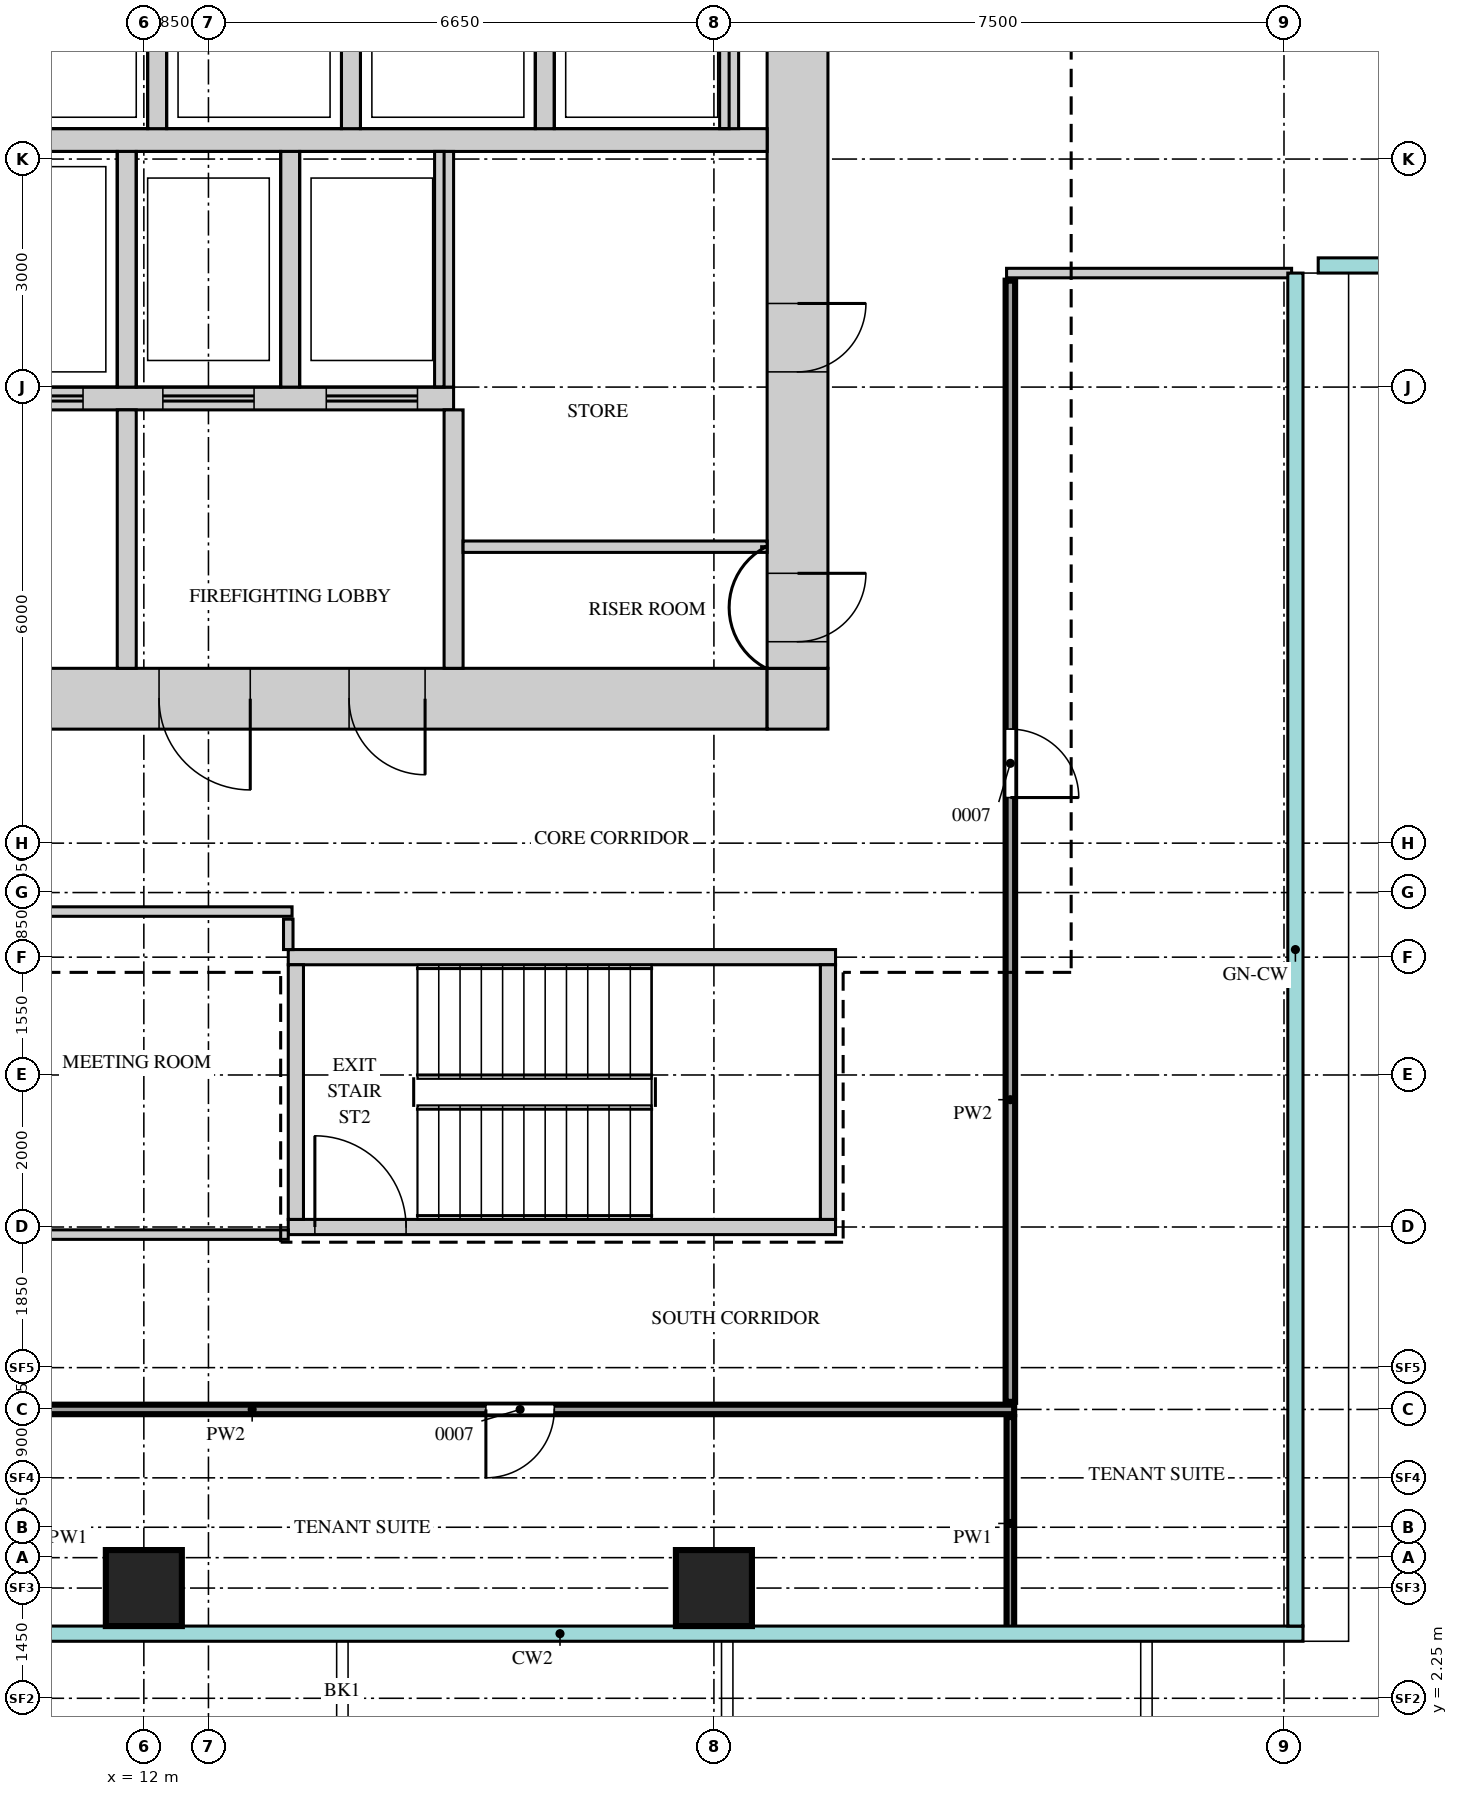
"""IFC4 building model, lengths in metres.
Left out: names, types, materials, properties, quantities, classifications, styles, units other than length and angle.
Written with IfcOpenShell. Run it as: python <this file> out.ifc"""

import sys

from ifc_helpers import new_model, si_unit, direction, frame, frame_2d, origin, origin_2d, place, context, subcontext, project, spatial, rectangle, extrude, source, transform, mapped, element, fill, save


model = new_model("IFC4")
c1 = context("Model", 3, precision=1e-05, world=origin(), true_north=direction((0.0, 1.0)))
c2 = subcontext(c1, "Body", "Model", "MODEL_VIEW")
j1 = project(units=[si_unit("LENGTHUNIT", "METRE"), si_unit("PLANEANGLEUNIT", "RADIAN")], contexts=[c1])
p1 = place(None, origin())
s1 = spatial("IfcSite", under=j1, at=p1, CompositionType="ELEMENT")
p2 = place(p1, origin())
s2 = spatial("IfcBuilding", under=s1, at=p2, CompositionType="ELEMENT")
p3 = place(p2, frame((0.0, 0.0, 176.7)))
s3 = spatial("IfcBuildingStorey", under=s2, at=p3, CompositionType="ELEMENT", Elevation=176.7)
m1 = source(origin(), c2, "Body", "SweptSolid", [
    extrude(rectangle(XDim=13.4, YDim=0.8, at=frame_2d((6.7, 0.0))), origin(), (0.0, 0.0, 1.0), 3.75),
])
p4 = place(p3, frame((6.8, 15.4, 0.0), z_axis=(0.0, 0.0, 1.0), x_axis=(1.0, 0.0, 0.0)))
e1 = element("IfcWall", 1, at=p4, inside=s3, PredefinedType="SHEAR", context=c2, shape_type="MappedRepresentation", body=[
    mapped(m1, transform((0.0, 0.0, 0.0))),
])
m2 = source(origin(), c2, "Body", "SweptSolid", [
    extrude(rectangle(XDim=1.2, YDim=2.1, at=frame_2d((0.6, 1.05))), frame((0.0, 0.41, 0.0), z_axis=(0.0, -1.0, 0.0), x_axis=(1.0, 0.0, 0.0)), (0.0, 0.0, 1.0), 0.82),
])
p5 = place(p4, frame((5.4, 0.0, 0.0)))
e2 = element("IfcOpeningElement", 2, at=p5, cuts=e1, PredefinedType="OPENING", context=c2, shape_type="MappedRepresentation", body=[
    mapped(m2, transform((0.0, 0.0, 0.0))),
])
p6 = place(p4, frame((2.05, 0.0, 0.0)))
e3 = element("IfcOpeningElement", 3, at=p6, cuts=e1, PredefinedType="OPENING", context=c2, shape_type="MappedRepresentation", body=[
    mapped(m2, transform((0.0, 0.0, 0.0))),
])
m3 = source(origin(), c2, "Body", "SweptSolid", [
    extrude(rectangle(XDim=1.0, YDim=2.1, at=frame_2d((0.5, 1.05))), frame((0.0, 0.41, 0.0), z_axis=(0.0, -1.0, 0.0), x_axis=(1.0, 0.0, 0.0)), (0.0, 0.0, 1.0), 0.82),
])
p7 = place(p4, frame((7.9, 0.0, 0.0)))
e4 = element("IfcOpeningElement", 4, at=p7, cuts=e1, PredefinedType="OPENING", context=c2, shape_type="MappedRepresentation", body=[
    mapped(m3, transform((0.0, 0.0, 0.0))),
])
m4 = source(origin(), c2, "Body", "SweptSolid", [
    extrude(rectangle(XDim=0.8, YDim=0.8, at=frame_2d((0.4, 0.0))), origin(), (0.0, 0.0, 1.0), 3.75),
])
p8 = place(p3, frame((20.2, 15.4, 0.0), z_axis=(0.0, 0.0, 1.0), x_axis=(1.0, 0.0, 0.0)))
e5 = element("IfcWall", 5, at=p8, inside=s3, PredefinedType="SHEAR", context=c2, shape_type="MappedRepresentation", body=[
    mapped(m4, transform((0.0, 0.0, 0.0))),
])
m5 = source(origin(), c2, "Body", "SweptSolid", [
    extrude(rectangle(XDim=22.4, YDim=0.8, at=frame_2d((11.2, 0.0))), origin(), (0.0, 0.0, 1.0), 3.75),
])
p9 = place(p3, frame((20.6, 15.8, 0.0), z_axis=(0.0, 0.0, 1.0), x_axis=(0.0, 1.0, 0.0)))
e6 = element("IfcWall", 6, at=p9, inside=s3, PredefinedType="SHEAR", context=c2, shape_type="MappedRepresentation", body=[
    mapped(m5, transform((0.0, 0.0, 0.0))),
])
m6 = source(origin(), c2, "Body", "SweptSolid", [
    extrude(rectangle(XDim=1.8, YDim=2.1, at=frame_2d((0.9, 1.05))), frame((0.0, 0.41, 0.0), z_axis=(0.0, -1.0, 0.0), x_axis=(1.0, 0.0, 0.0)), (0.0, 0.0, 1.0), 0.82),
])
p10 = place(p9, frame((10.7, 0.0, 0.0)))
e7 = element("IfcOpeningElement", 7, at=p10, cuts=e6, PredefinedType="OPENING", context=c2, shape_type="MappedRepresentation", body=[
    mapped(m6, transform((0.0, 0.0, 0.0))),
])
m7 = source(origin(), c2, "Body", "SweptSolid", [
    extrude(rectangle(XDim=0.9, YDim=2.1, at=frame_2d((0.45, 1.05))), frame((0.0, 0.41, 0.0), z_axis=(0.0, -1.0, 0.0), x_axis=(1.0, 0.0, 0.0)), (0.0, 0.0, 1.0), 0.82),
])
p11 = place(p9, frame((0.35, 0.0, 0.0)))
e8 = element("IfcOpeningElement", 8, at=p11, cuts=e6, PredefinedType="OPENING", context=c2, shape_type="MappedRepresentation", body=[
    mapped(m7, transform((0.0, 0.0, 0.0))),
])
p12 = place(p9, frame((3.9, 0.0, 0.0)))
e9 = element("IfcOpeningElement", 9, at=p12, cuts=e6, PredefinedType="OPENING", context=c2, shape_type="MappedRepresentation", body=[
    mapped(m7, transform((0.0, 0.0, 0.0))),
])
m8 = source(origin(), c2, "Body", "SweptSolid", [
    extrude(rectangle(XDim=7.2, YDim=0.2, at=frame_2d((3.6, 0.0))), origin(), (0.0, 0.0, 1.0), 3.75),
])
p13 = place(p3, frame((13.9, 12.0, 0.0), z_axis=(0.0, 0.0, 1.0), x_axis=(1.0, 0.0, 0.0)))
e10 = element("IfcWall", 10, at=p13, inside=s3, PredefinedType="SHEAR", context=c2, shape_type="MappedRepresentation", body=[
    mapped(m8, transform((0.0, 0.0, 0.0))),
])
p14 = place(p3, frame((13.9, 8.45, 0.0), z_axis=(0.0, 0.0, 1.0), x_axis=(1.0, 0.0, 0.0)))
e11 = element("IfcWall", 11, at=p14, inside=s3, PredefinedType="SHEAR", context=c2, shape_type="MappedRepresentation", body=[
    mapped(m8, transform((0.0, 0.0, 0.0))),
])
m9 = source(origin(), c2, "Body", "SweptSolid", [
    extrude(rectangle(XDim=1.2, YDim=2.1, at=frame_2d((0.6, 1.05))), frame((0.0, 0.11, 0.0), z_axis=(0.0, -1.0, 0.0), x_axis=(1.0, 0.0, 0.0)), (0.0, 0.0, 1.0), 0.22),
])
p15 = place(p14, frame((0.35, 0.0, 0.0)))
e12 = element("IfcOpeningElement", 12, at=p15, cuts=e11, PredefinedType="OPENING", context=c2, shape_type="MappedRepresentation", body=[
    mapped(m9, transform((0.0, 0.0, 0.0))),
])
m10 = source(origin(), c2, "Body", "SweptSolid", [
    extrude(rectangle(XDim=3.35, YDim=0.2, at=frame_2d((1.675, 0.0))), origin(), (0.0, 0.0, 1.0), 3.75),
])
for number, where, z_axis, x_axis in (
    (13, (21.0, 8.55, 0.0), (0.0, 0.0, 1.0), (0.0, 1.0, 0.0)),
    (14, (14.0, 8.55, 0.0), (0.0, 0.0, 1.0), (0.0, 1.0, 0.0)),
):
    element("IfcWall", number, at=place(p3, frame(where, z_axis=z_axis, x_axis=x_axis)), inside=s3, PredefinedType="SHEAR", context=c2, shape_type="MappedRepresentation", body=[
        mapped(m10, transform((0.0, 0.0, 0.0))),
    ])
m11 = source(origin(), c2, "Body", "SweptSolid", [
    extrude(rectangle(XDim=13.4, YDim=0.3, at=frame_2d((6.7, 0.0))), origin(), (0.0, 0.0, 1.0), 3.75),
])
p16 = place(p3, frame((6.8, 22.75, 0.0), z_axis=(0.0, 0.0, 1.0), x_axis=(1.0, 0.0, 0.0)))
e15 = element("IfcWall", 15, at=p16, inside=s3, PredefinedType="STANDARD", context=c2, shape_type="MappedRepresentation", body=[
    mapped(m11, transform((0.0, 0.0, 0.0))),
])
m12 = source(origin(), c2, "Body", "SweptSolid", [
    extrude(rectangle(XDim=9.275, YDim=0.3, at=frame_2d((4.637, 0.0))), origin(), (0.0, 0.0, 1.0), 3.75),
])
p17 = place(p3, frame((6.8, 19.35, 0.0), z_axis=(0.0, 0.0, 1.0), x_axis=(1.0, 0.0, 0.0)))
e16 = element("IfcWall", 16, at=p17, inside=s3, PredefinedType="STANDARD", context=c2, shape_type="MappedRepresentation", body=[
    mapped(m12, transform((0.0, 0.0, 0.0))),
])
m13 = source(origin(), c2, "Body", "SweptSolid", [
    extrude(rectangle(XDim=1.2, YDim=2.1, at=frame_2d((0.6, 1.05))), frame((0.0, 0.16, 0.0), z_axis=(0.0, -1.0, 0.0), x_axis=(1.0, 0.0, 0.0)), (0.0, 0.0, 1.0), 0.32),
])
p18 = place(p17, frame((0.85, 0.0, 0.0)))
e17 = element("IfcOpeningElement", 17, at=p18, cuts=e16, PredefinedType="OPENING", context=c2, shape_type="MappedRepresentation", body=[
    mapped(m13, transform((0.0, 0.0, 0.0))),
])
p19 = place(p17, frame((3.2, 0.0, 0.0)))
e18 = element("IfcOpeningElement", 18, at=p19, cuts=e16, PredefinedType="OPENING", context=c2, shape_type="MappedRepresentation", body=[
    mapped(m13, transform((0.0, 0.0, 0.0))),
])
p20 = place(p17, frame((5.45, 0.0, 0.0)))
e19 = element("IfcOpeningElement", 19, at=p20, cuts=e16, PredefinedType="OPENING", context=c2, shape_type="MappedRepresentation", body=[
    mapped(m13, transform((0.0, 0.0, 0.0))),
])
p21 = place(p17, frame((7.6, 0.0, 0.0)))
e20 = element("IfcOpeningElement", 20, at=p21, cuts=e16, PredefinedType="OPENING", context=c2, shape_type="MappedRepresentation", body=[
    mapped(m13, transform((0.0, 0.0, 0.0))),
])
m14 = source(origin(), c2, "Body", "SweptSolid", [
    extrude(rectangle(XDim=3.1, YDim=0.25, at=frame_2d((1.55, 0.0))), origin(), (0.0, 0.0, 1.0), 3.75),
])
for number, where, z_axis, x_axis in (
    (21, (11.775, 19.5, 0.0), (0.0, 0.0, 1.0), (0.0, 1.0, 0.0)),
    (22, (13.925, 19.5, 0.0), (0.0, 0.0, 1.0), (0.0, 1.0, 0.0)),
    (23, (15.95, 19.5, 0.0), (0.0, 0.0, 1.0), (0.0, 1.0, 0.0)),
):
    element("IfcWall", number, at=place(p3, frame(where, z_axis=z_axis, x_axis=x_axis)), inside=s3, PredefinedType="STANDARD", context=c2, shape_type="MappedRepresentation", body=[
        mapped(m14, transform((0.0, 0.0, 0.0))),
    ])
m15 = source(origin(), c2, "Body", "SweptSolid", [
    extrude(rectangle(XDim=2.4, YDim=0.25, at=frame_2d((1.2, 0.0))), origin(), (0.0, 0.0, 1.0), 3.75),
])
for number, where, z_axis, x_axis in (
    (24, (17.275, 22.9, 0.0), (0.0, 0.0, 1.0), (0.0, 1.0, 0.0)),
    (25, (19.7, 22.9, 0.0), (0.0, 0.0, 1.0), (0.0, 1.0, 0.0)),
    (26, (12.175, 22.9, 0.0), (0.0, 0.0, 1.0), (0.0, 1.0, 0.0)),
    (27, (14.725, 22.9, 0.0), (0.0, 0.0, 1.0), (0.0, 1.0, 0.0)),
):
    element("IfcWall", number, at=place(p3, frame(where, z_axis=z_axis, x_axis=x_axis)), inside=s3, PredefinedType="STANDARD", context=c2, shape_type="MappedRepresentation", body=[
        mapped(m15, transform((0.0, 0.0, 0.0))),
    ])
m16 = source(origin(), c2, "Body", "SweptSolid", [
    extrude(rectangle(XDim=3.4, YDim=0.25, at=frame_2d((1.7, 0.0))), origin(), (0.0, 0.0, 1.0), 3.75),
])
for number, where, z_axis, x_axis in (
    (28, (16.075, 15.8, 0.0), (0.0, 0.0, 1.0), (0.0, 1.0, 0.0)),
    (29, (11.775, 15.8, 0.0), (0.0, 0.0, 1.0), (0.0, 1.0, 0.0)),
):
    element("IfcWall", number, at=place(p3, frame(where, z_axis=z_axis, x_axis=x_axis)), inside=s3, PredefinedType="STANDARD", context=c2, shape_type="MappedRepresentation", body=[
        mapped(m16, transform((0.0, 0.0, 0.0))),
    ])
m17 = source(origin(), c2, "Body", "SweptSolid", [
    extrude(rectangle(XDim=1.0, YDim=1.0, at=origin_2d()), origin(), (0.0, 0.0, 1.0), 3.75),
])
for number, where, z_axis, x_axis in (
    (30, (12.0, 3.7, 0.0), (0.0, 0.0, 1.0), (1.0, 0.0, 0.0)),
    (31, (19.5, 3.7, 0.0), (0.0, 0.0, 1.0), (1.0, 0.0, 0.0)),
):
    element("IfcColumn", number, at=place(p3, frame(where, z_axis=z_axis, x_axis=x_axis)), inside=s3, PredefinedType="COLUMN", context=c2, shape_type="MappedRepresentation", body=[
        mapped(m17, transform((0.0, 0.0, 0.0))),
    ])
m18 = source(origin(), c2, "Body", "SweptSolid", [
    extrude(rectangle(XDim=2.8, YDim=0.1, at=frame_2d((1.4, 0.0))), origin(), (0.0, 0.0, 1.0), 3.8),
])
p22 = place(p3, frame((23.4, 3.15, 0.0), z_axis=(0.0, 0.0, 1.0), x_axis=(0.0, 1.0, 0.0)))
e32 = element("IfcWall", 32, at=p22, inside=s3, PredefinedType="PARTITIONING", context=c2, shape_type="MappedRepresentation", body=[
    mapped(m18, transform((0.0, 0.0, 0.0))),
])
m19 = source(origin(), c2, "Body", "SweptSolid", [
    extrude(rectangle(XDim=15.8, YDim=0.125, at=frame_2d((7.9, 0.0))), origin(), (0.0, 0.0, 1.0), 3.8),
])
p23 = place(p3, frame((7.65, 6.05, 0.0), z_axis=(0.0, 0.0, 1.0), x_axis=(1.0, 0.0, 0.0)))
e33 = element("IfcWall", 33, at=p23, inside=s3, PredefinedType="PARTITIONING", context=c2, shape_type="MappedRepresentation", body=[
    mapped(m19, transform((0.0, 0.0, 0.0))),
])
m20 = source(origin(), c2, "Body", "SweptSolid", [
    extrude(rectangle(XDim=0.9, YDim=2.1, at=frame_2d((0.45, 1.05))), frame((0.0, 0.073, 0.0), z_axis=(0.0, -1.0, 0.0), x_axis=(1.0, 0.0, 0.0)), (0.0, 0.0, 1.0), 0.145),
])
p24 = place(p23, frame((1.8, 0.0, 0.0)))
e34 = element("IfcOpeningElement", 34, at=p24, cuts=e33, PredefinedType="OPENING", context=c2, shape_type="MappedRepresentation", body=[
    mapped(m20, transform((0.0, 0.0, 0.0))),
])
p25 = place(p23, frame((8.85, 0.0, 0.0)))
e35 = element("IfcOpeningElement", 35, at=p25, cuts=e33, PredefinedType="OPENING", context=c2, shape_type="MappedRepresentation", body=[
    mapped(m20, transform((0.0, 0.0, 0.0))),
])
m21 = source(origin(), c2, "Body", "SweptSolid", [
    extrude(rectangle(XDim=14.75, YDim=0.125, at=frame_2d((7.375, 0.0))), origin(), (0.0, 0.0, 1.0), 3.8),
])
p26 = place(p3, frame((23.4, 6.15, 0.0), z_axis=(0.0, 0.0, 1.0), x_axis=(0.0, 1.0, 0.0)))
e36 = element("IfcWall", 36, at=p26, inside=s3, PredefinedType="PARTITIONING", context=c2, shape_type="MappedRepresentation", body=[
    mapped(m21, transform((0.0, 0.0, 0.0))),
])
p27 = place(p26, frame((7.95, 0.0, 0.0)))
e37 = element("IfcOpeningElement", 37, at=p27, cuts=e36, PredefinedType="OPENING", context=c2, shape_type="MappedRepresentation", body=[
    mapped(m20, transform((0.0, 0.0, 0.0))),
])
m22 = source(origin(), c2, "Body", "SweptSolid", [
    extrude(rectangle(XDim=7.95, YDim=0.125, at=frame_2d((3.975, 0.0))), origin(), (0.0, 0.0, 1.0), 3.25),
])
p28 = place(p3, frame((5.95, 8.35, 0.0), z_axis=(0.0, 0.0, 1.0), x_axis=(1.0, 0.0, 0.0)))
e38 = element("IfcWall", 38, at=p28, inside=s3, PredefinedType="PARTITIONING", context=c2, shape_type="MappedRepresentation", body=[
    mapped(m22, transform((0.0, 0.0, 0.0))),
])
p29 = place(p28, frame((3.8, 0.0, 0.0)))
e39 = element("IfcOpeningElement", 39, at=p29, cuts=e38, PredefinedType="OPENING", context=c2, shape_type="MappedRepresentation", body=[
    mapped(m20, transform((0.0, 0.0, 0.0))),
])
m23 = source(origin(), c2, "Body", "SweptSolid", [
    extrude(rectangle(XDim=0.4, YDim=0.125, at=frame_2d((0.2, 0.0))), origin(), (0.0, 0.0, 1.0), 3.8),
])
p30 = place(p3, frame((13.9, 12.1, 0.0), z_axis=(0.0, 0.0, 1.0), x_axis=(0.0, 1.0, 0.0)))
e40 = element("IfcWall", 40, at=p30, inside=s3, PredefinedType="PARTITIONING", context=c2, shape_type="MappedRepresentation", body=[
    mapped(m23, transform((0.0, 0.0, 0.0))),
])
m24 = source(origin(), c2, "Body", "SweptSolid", [
    extrude(rectangle(XDim=8.0, YDim=0.125, at=frame_2d((4.0, 0.0))), origin(), (0.0, 0.0, 1.0), 3.8),
])
p31 = place(p3, frame((5.95, 12.6, 0.0), z_axis=(0.0, 0.0, 1.0), x_axis=(1.0, 0.0, 0.0)))
e41 = element("IfcWall", 41, at=p31, inside=s3, PredefinedType="PARTITIONING", context=c2, shape_type="MappedRepresentation", body=[
    mapped(m24, transform((0.0, 0.0, 0.0))),
])
m25 = source(origin(), c2, "Body", "SweptSolid", [
    extrude(rectangle(XDim=4.0, YDim=0.15, at=frame_2d((2.0, 0.0))), origin(), (0.0, 0.0, 1.0), 3.8),
])
p32 = place(p3, frame((16.2, 17.4, 0.0), z_axis=(0.0, 0.0, 1.0), x_axis=(1.0, 0.0, 0.0)))
e42 = element("IfcWall", 42, at=p32, inside=s3, PredefinedType="PARTITIONING", context=c2, shape_type="MappedRepresentation", body=[
    mapped(m25, transform((0.0, 0.0, 0.0))),
])
m26 = source(origin(), c2, "Body", "SweptSolid", [
    extrude(rectangle(XDim=3.75, YDim=0.125, at=frame_2d((1.875, 0.0))), origin(), (0.0, 0.0, 1.0), 3.8),
])
p33 = place(p3, frame((23.35, 21.0, 0.0), z_axis=(0.0, 0.0, 1.0), x_axis=(1.0, 0.0, 0.0)))
e43 = element("IfcWall", 43, at=p33, inside=s3, PredefinedType="PARTITIONING", context=c2, shape_type="MappedRepresentation", body=[
    mapped(m26, transform((0.0, 0.0, 0.0))),
])
m27 = source(origin(), c2, "Body", "SweptSolid", [
    extrude(rectangle(XDim=0.9, YDim=2.1, at=frame_2d((0.45, 1.05))), frame((0.0, 0.35, 0.0), z_axis=(0.0, -1.0, 0.0), x_axis=(1.0, 0.0, 0.0)), (0.0, 0.0, 1.0), 0.7),
])
p34 = place(p11, origin())
e44 = element("IfcDoor", 44, at=p34, inside=s3, OperationType="SINGLE_SWING_RIGHT", PredefinedType="DOOR", context=c2, shape_type="MappedRepresentation", body=[
    mapped(m27, transform((0.0, 0.0, 0.0))),
])
fill(e8, e44)
p35 = place(p12, origin())
e45 = element("IfcDoor", 45, at=p35, inside=s3, OperationType="SINGLE_SWING_RIGHT", PredefinedType="DOOR", context=c2, shape_type="MappedRepresentation", body=[
    mapped(m27, transform((0.0, 0.0, 0.0))),
])
fill(e9, e45)
m28 = source(origin(), c2, "Body", "SweptSolid", [
    extrude(rectangle(XDim=1.2, YDim=2.1, at=frame_2d((0.6, 1.05))), frame((0.0, 0.35, 0.0), z_axis=(0.0, -1.0, 0.0), x_axis=(1.0, 0.0, 0.0)), (0.0, 0.0, 1.0), 0.7),
])
p36 = place(p5, origin())
e46 = element("IfcDoor", 46, at=p36, inside=s3, OperationType="SINGLE_SWING_RIGHT", PredefinedType="DOOR", context=c2, shape_type="MappedRepresentation", body=[
    mapped(m28, transform((0.0, 0.0, 0.0))),
])
fill(e2, e46)
m29 = source(origin(), c2, "Body", "SweptSolid", [
    extrude(rectangle(XDim=1.0, YDim=2.1, at=frame_2d((0.5, 1.05))), frame((0.0, 0.35, 0.0), z_axis=(0.0, -1.0, 0.0), x_axis=(1.0, 0.0, 0.0)), (0.0, 0.0, 1.0), 0.7),
])
p37 = place(p7, origin())
e47 = element("IfcDoor", 47, at=p37, inside=s3, OperationType="SINGLE_SWING_RIGHT", PredefinedType="DOOR", context=c2, shape_type="MappedRepresentation", body=[
    mapped(m29, transform((0.0, 0.0, 0.0))),
])
fill(e4, e47)
m30 = source(origin(), c2, "Body", "SweptSolid", [
    extrude(rectangle(XDim=0.9, YDim=2.1, at=frame_2d((0.45, 1.05))), frame((0.0, 0.025, 0.0), z_axis=(0.0, -1.0, 0.0), x_axis=(1.0, 0.0, 0.0)), (0.0, 0.0, 1.0), 0.05),
])
p38 = place(p27, origin())
e48 = element("IfcDoor", 48, at=p38, inside=s3, OperationType="SINGLE_SWING_LEFT", PredefinedType="DOOR", context=c2, shape_type="MappedRepresentation", body=[
    mapped(m30, transform((0.0, 0.0, 0.0))),
])
fill(e37, e48)
p39 = place(p25, origin())
e49 = element("IfcDoor", 49, at=p39, inside=s3, OperationType="SINGLE_SWING_LEFT", PredefinedType="DOOR", context=c2, shape_type="MappedRepresentation", body=[
    mapped(m30, transform((0.0, 0.0, 0.0))),
])
fill(e35, e49)
m31 = source(origin(), c2, "Body", "SweptSolid", [
    extrude(rectangle(XDim=1.2, YDim=2.1, at=frame_2d((0.6, 1.05))), frame((0.0, 0.025, 0.0), z_axis=(0.0, -1.0, 0.0), x_axis=(1.0, 0.0, 0.0)), (0.0, 0.0, 1.0), 0.05),
])
p40 = place(p15, origin())
e50 = element("IfcDoor", 50, at=p40, inside=s3, OperationType="SINGLE_SWING_RIGHT", PredefinedType="DOOR", context=c2, shape_type="MappedRepresentation", body=[
    mapped(m31, transform((0.0, 0.0, 0.0))),
])
fill(e12, e50)
p41 = place(p19, origin())
e51 = element("IfcDoor", 51, at=p41, inside=s3, OperationType="DOUBLE_DOOR_SLIDING", PredefinedType="DOOR", context=c2, shape_type="MappedRepresentation", body=[
    mapped(m31, transform((0.0, 0.0, 0.0))),
])
fill(e18, e51)
p42 = place(p20, origin())
e52 = element("IfcDoor", 52, at=p42, inside=s3, OperationType="DOUBLE_DOOR_SLIDING", PredefinedType="DOOR", context=c2, shape_type="MappedRepresentation", body=[
    mapped(m31, transform((0.0, 0.0, 0.0))),
])
fill(e19, e52)
p43 = place(p21, origin())
e53 = element("IfcDoor", 53, at=p43, inside=s3, OperationType="DOUBLE_DOOR_SLIDING", PredefinedType="DOOR", context=c2, shape_type="MappedRepresentation", body=[
    mapped(m31, transform((0.0, 0.0, 0.0))),
])
fill(e20, e53)
save(model, sys.argv[1])
